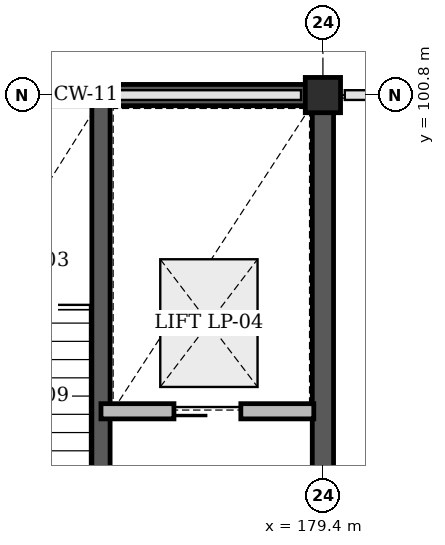
"""IFC4 building model, lengths in metres.
Left out: names, types, materials, properties, quantities, classifications, styles, units other than length and angle.
Written with IfcOpenShell. Run it as: python <this file> out.ifc"""

import sys

from ifc_helpers import new_model, si_unit, direction, frame, frame_2d, origin, origin_2d, place, context, subcontext, project, spatial, rectangle, extrude, element, fill, save


model = new_model("IFC4")
c1 = context("Model", 3, precision=1e-05, world=origin(), true_north=direction((0.0, 1.0)))
c2 = subcontext(c1, "Body", "Model", "MODEL_VIEW")
j1 = project(units=[si_unit("LENGTHUNIT", "METRE"), si_unit("PLANEANGLEUNIT", "RADIAN")], contexts=[c1])
p1 = place(None, origin())
s1 = spatial("IfcSite", under=j1, at=p1, CompositionType="ELEMENT")
p2 = place(p1, origin())
s2 = spatial("IfcBuilding", under=s1, at=p2, CompositionType="ELEMENT")
p3 = place(p2, frame((0.0, 0.0, 14.4)))
s3 = spatial("IfcBuildingStorey", under=s2, at=p3, CompositionType="ELEMENT", Elevation=14.4)
p4 = place(p3, frame((171.425, 100.8, 0.0), z_axis=(0.0, 0.0, 1.0), x_axis=(1.0, 0.0, 0.0)))
e1 = element("IfcWall", 1, at=p4, inside=s3, PredefinedType="SHEAR", context=c2, shape_type="SweptSolid", body=[
    extrude(rectangle(XDim=8.15, YDim=0.35, at=frame_2d((4.075, 0.0))), origin(), (0.0, 0.0, 1.0), 3.28),
])
p5 = place(p3, frame((179.4, 92.4, 0.0), z_axis=(0.0, 0.0, 1.0), x_axis=(0.0, 1.0, 0.0)))
e2 = element("IfcWall", 2, at=p5, inside=s3, PredefinedType="SHEAR", context=c2, shape_type="SweptSolid", body=[
    extrude(rectangle(XDim=8.4, YDim=0.35, at=frame_2d((4.2, 0.0))), origin(), (0.0, 0.0, 1.0), 3.28),
])
p6 = place(p3, frame((179.4, 100.8, 0.0), z_axis=(0.0, 0.0, 1.0), x_axis=(1.0, 0.0, 0.0)))
e3 = element("IfcColumn", 3, at=p6, inside=s3, PredefinedType="COLUMN", context=c2, shape_type="SweptSolid", body=[
    extrude(rectangle(XDim=0.58, YDim=0.58, at=origin_2d()), origin(), (0.0, 0.0, 1.0), 3.6),
])
p7 = place(p3, frame((175.75, 92.4, 0.0), z_axis=(0.0, 0.0, 1.0), x_axis=(0.0, 1.0, 0.0)))
e4 = element("IfcWall", 4, at=p7, inside=s3, PredefinedType="SHEAR", context=c2, shape_type="SweptSolid", body=[
    extrude(rectangle(XDim=8.4, YDim=0.3, at=frame_2d((4.2, 0.0))), origin(), (0.0, 0.0, 1.0), 3.6),
])
p8 = place(p3, frame((175.75, 95.6, 0.0), z_axis=(0.0, 0.0, 1.0), x_axis=(1.0, 0.0, 0.0)))
e5 = element("IfcWall", 5, at=p8, inside=s3, PredefinedType="STANDARD", context=c2, shape_type="SweptSolid", body=[
    extrude(rectangle(XDim=3.5, YDim=0.25, at=frame_2d((1.75, 0.0))), origin(), (0.0, 0.0, 1.0), 3.3),
])
p9 = place(p8, frame((1.2, 0.0, 0.0)))
e6 = element("IfcOpeningElement", 6, at=p9, cuts=e5, PredefinedType="OPENING", context=c2, shape_type="SweptSolid", body=[
    extrude(rectangle(XDim=1.1, YDim=2.2, at=frame_2d((0.55, 1.1))), frame((0.0, 0.135, 0.0), z_axis=(0.0, -1.0, 0.0), x_axis=(1.0, 0.0, 0.0)), (0.0, 0.0, 1.0), 0.27),
])
p10 = place(p9, origin())
e7 = element("IfcDoor", 7, at=p10, inside=s3, OperationType="SLIDING_TO_LEFT", PredefinedType="DOOR", context=c2, shape_type="SweptSolid", body=[
    extrude(rectangle(XDim=1.1, YDim=2.2, at=frame_2d((0.55, 1.1))), frame((0.0, 0.025, 0.0), z_axis=(0.0, -1.0, 0.0), x_axis=(1.0, 0.0, 0.0)), (0.0, 0.0, 1.0), 0.05),
])
fill(e6, e7)
save(model, sys.argv[1])
